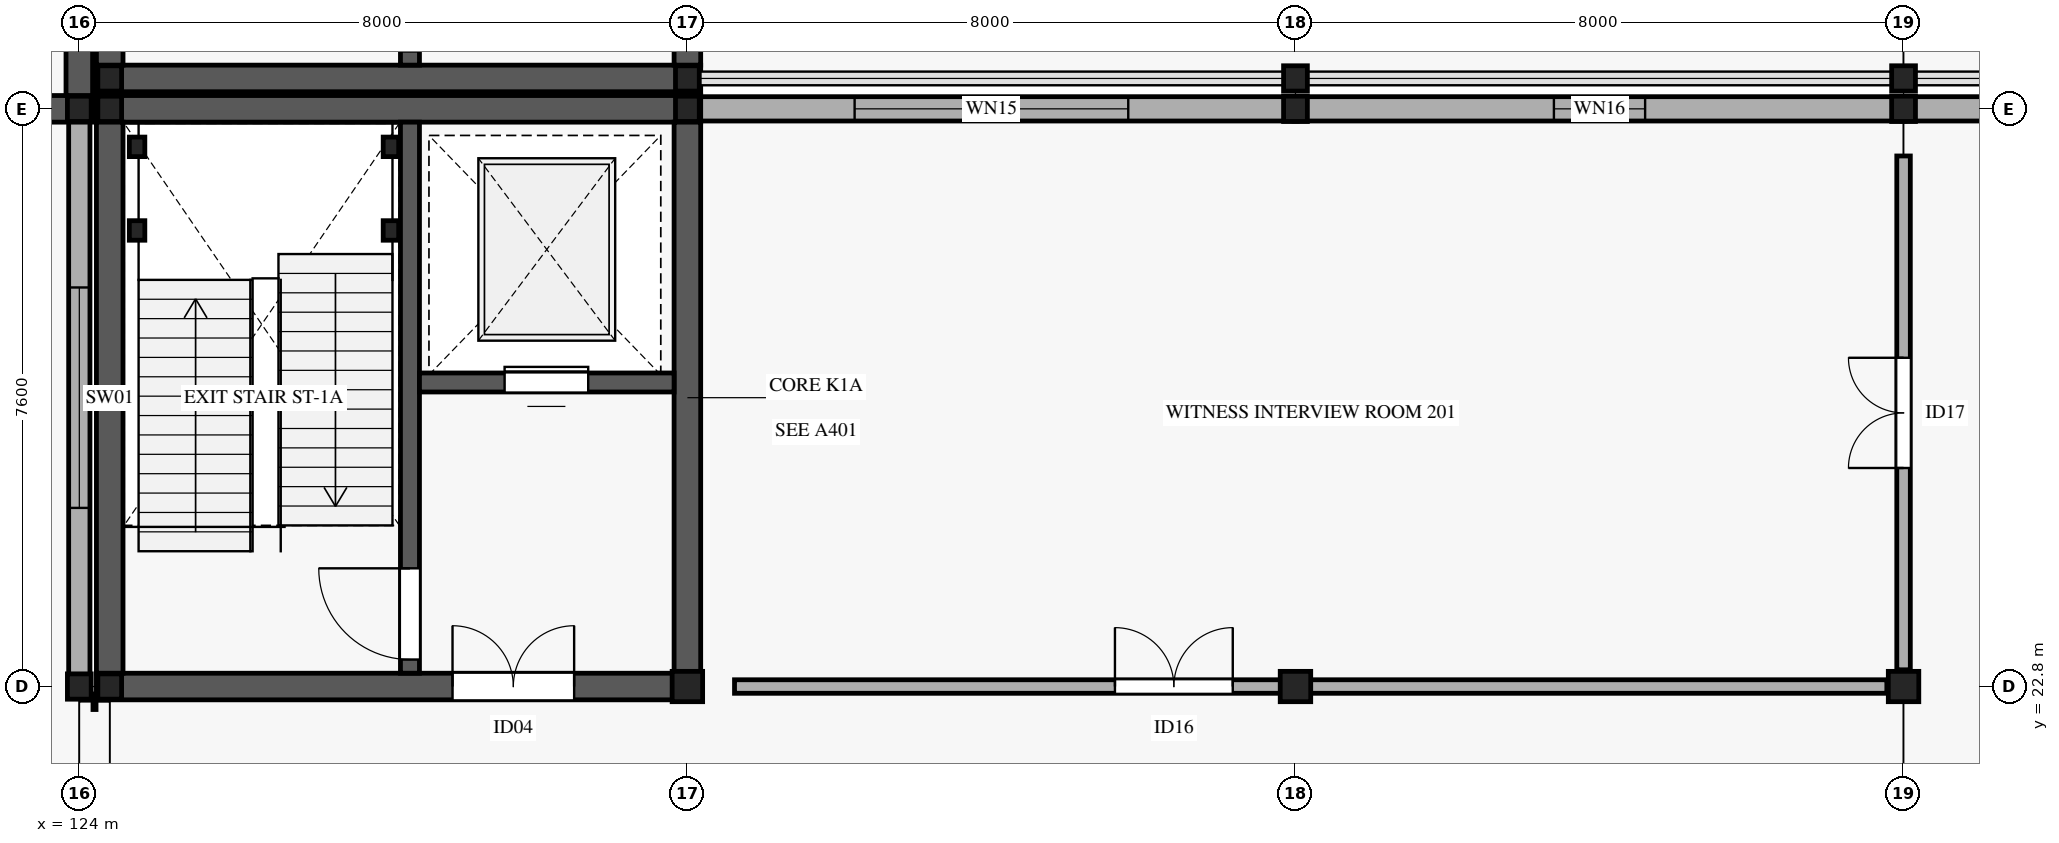
"""IFC4 building model, lengths in metres.
Left out: names, types, materials, properties, quantities, classifications, styles, units other than length and angle.
Written with IfcOpenShell. Run it as: python <this file> out.ifc"""

import sys

from ifc_helpers import new_model, si_unit, direction, frame, frame_2d, origin, origin_2d, place, context, subcontext, project, spatial, rectangle, i_section, extrude, element, fill, save


model = new_model("IFC4")
c1 = context("Model", 3, precision=1e-05, world=origin(), true_north=direction((0.0, 1.0)))
c2 = subcontext(c1, "Body", "Model", "MODEL_VIEW")
j1 = project(units=[si_unit("LENGTHUNIT", "METRE"), si_unit("PLANEANGLEUNIT", "RADIAN")], contexts=[c1])
p1 = place(None, origin())
s1 = spatial("IfcSite", under=j1, at=p1, CompositionType="ELEMENT")
p2 = place(p1, origin())
s2 = spatial("IfcBuilding", under=s1, at=p2, CompositionType="ELEMENT")
p3 = place(p2, frame((0.0, 0.0, 5.4)))
s3 = spatial("IfcBuildingStorey", under=s2, at=p3, CompositionType="ELEMENT", Elevation=5.4)
for number, where, z_axis, x_axis in (
    (1, (124.4, 22.8, 0.0), (0.0, 0.0, 1.0), (1.0, 0.0, 0.0)),
    (2, (124.4, 30.4, 0.0), (0.0, 0.0, 1.0), (1.0, 0.0, 0.0)),
):
    element("IfcColumn", number, at=place(p3, frame(where, z_axis=z_axis, x_axis=x_axis)), inside=s3, PredefinedType="COLUMN", context=c2, shape_type="SweptSolid", body=[
        extrude(i_section(OverallWidth=0.313, OverallDepth=0.333, WebThickness=0.018, FlangeThickness=0.028, FilletRadius=0.015, at=origin_2d()), origin(), (0.0, 0.0, 1.0), 5.185),
    ])
p4 = place(p3, frame((132.0, 22.8, 0.0), z_axis=(0.0, 0.0, 1.0), x_axis=(1.0, 0.0, 0.0)))
e3 = element("IfcColumn", 3, at=p4, inside=s3, PredefinedType="COLUMN", context=c2, shape_type="SweptSolid", body=[
    extrude(i_section(OverallWidth=0.401, OverallDepth=0.399, WebThickness=0.025, FlangeThickness=0.04, FilletRadius=0.015, at=origin_2d()), origin(), (0.0, 0.0, 1.0), 5.185),
])
p5 = place(p3, frame((132.0, 30.4, 0.0), z_axis=(0.0, 0.0, 1.0), x_axis=(1.0, 0.0, 0.0)))
e4 = element("IfcColumn", 4, at=p5, inside=s3, PredefinedType="COLUMN", context=c2, shape_type="SweptSolid", body=[
    extrude(i_section(OverallWidth=0.313, OverallDepth=0.333, WebThickness=0.018, FlangeThickness=0.028, FilletRadius=0.015, at=origin_2d()), origin(), (0.0, 0.0, 1.0), 5.185),
])
p6 = place(p3, frame((140.0, 22.8, 0.0), z_axis=(0.0, 0.0, 1.0), x_axis=(1.0, 0.0, 0.0)))
e5 = element("IfcColumn", 5, at=p6, inside=s3, PredefinedType="COLUMN", context=c2, shape_type="SweptSolid", body=[
    extrude(i_section(OverallWidth=0.401, OverallDepth=0.399, WebThickness=0.025, FlangeThickness=0.04, FilletRadius=0.015, at=origin_2d()), origin(), (0.0, 0.0, 1.0), 5.185),
])
p7 = place(p3, frame((140.0, 30.4, 0.0), z_axis=(0.0, 0.0, 1.0), x_axis=(1.0, 0.0, 0.0)))
e6 = element("IfcColumn", 6, at=p7, inside=s3, PredefinedType="COLUMN", context=c2, shape_type="SweptSolid", body=[
    extrude(i_section(OverallWidth=0.313, OverallDepth=0.333, WebThickness=0.018, FlangeThickness=0.028, FilletRadius=0.015, at=origin_2d()), origin(), (0.0, 0.0, 1.0), 5.185),
])
p8 = place(p3, frame((148.0, 22.8, 0.0), z_axis=(0.0, 0.0, 1.0), x_axis=(1.0, 0.0, 0.0)))
e7 = element("IfcColumn", 7, at=p8, inside=s3, PredefinedType="COLUMN", context=c2, shape_type="SweptSolid", body=[
    extrude(i_section(OverallWidth=0.401, OverallDepth=0.399, WebThickness=0.025, FlangeThickness=0.04, FilletRadius=0.015, at=origin_2d()), origin(), (0.0, 0.0, 1.0), 5.185),
])
for number, where, z_axis, x_axis in (
    (8, (148.0, 30.4, 0.0), (0.0, 0.0, 1.0), (1.0, 0.0, 0.0)),
    (9, (124.4, 30.8, 0.0), (0.0, 0.0, 1.0), (1.0, 0.0, 0.0)),
    (10, (132.0, 30.8, 0.0), (0.0, 0.0, 1.0), (1.0, 0.0, 0.0)),
    (11, (140.0, 30.8, 0.0), (0.0, 0.0, 1.0), (1.0, 0.0, 0.0)),
    (12, (148.0, 30.8, 0.0), (0.0, 0.0, 1.0), (1.0, 0.0, 0.0)),
    (13, (124.0, 22.8, 0.0), (0.0, 0.0, 1.0), (1.0, 0.0, 0.0)),
    (14, (124.0, 30.4, 0.0), (0.0, 0.0, 1.0), (1.0, 0.0, 0.0)),
):
    element("IfcColumn", number, at=place(p3, frame(where, z_axis=z_axis, x_axis=x_axis)), inside=s3, PredefinedType="COLUMN", context=c2, shape_type="SweptSolid", body=[
        extrude(i_section(OverallWidth=0.313, OverallDepth=0.333, WebThickness=0.018, FlangeThickness=0.028, FilletRadius=0.015, at=origin_2d()), origin(), (0.0, 0.0, 1.0), 5.185),
    ])
p9 = place(p3, frame((131.98, 30.4, 0.0), z_axis=(0.0, 0.0, 1.0), x_axis=(1.0, 0.0, 0.0)))
e15 = element("IfcWall", 15, at=p9, inside=s3, PredefinedType="STANDARD", context=c2, shape_type="SweptSolid", body=[
    extrude(rectangle(XDim=8.04, YDim=0.32, at=frame_2d((4.02, 0.0))), origin(), (0.0, 0.0, 1.0), 4.25),
])
p10 = place(p9, frame((2.22, 0.0, 0.75)))
e16 = element("IfcOpeningElement", 16, at=p10, cuts=e15, PredefinedType="OPENING", context=c2, shape_type="SweptSolid", body=[
    extrude(rectangle(XDim=3.6, YDim=2.15, at=frame_2d((1.8, 1.075))), frame((0.0, 0.17, 0.0), z_axis=(0.0, -1.0, 0.0), x_axis=(1.0, 0.0, 0.0)), (0.0, 0.0, 1.0), 0.34),
])
p11 = place(p3, frame((139.98, 30.4, 0.0), z_axis=(0.0, 0.0, 1.0), x_axis=(1.0, 0.0, 0.0)))
e17 = element("IfcWall", 17, at=p11, inside=s3, PredefinedType="STANDARD", context=c2, shape_type="SweptSolid", body=[
    extrude(rectangle(XDim=8.04, YDim=0.32, at=frame_2d((4.02, 0.0))), origin(), (0.0, 0.0, 1.0), 4.25),
])
p12 = place(p11, frame((3.42, 0.0, 0.75)))
e18 = element("IfcOpeningElement", 18, at=p12, cuts=e17, PredefinedType="OPENING", context=c2, shape_type="SweptSolid", body=[
    extrude(rectangle(XDim=1.2, YDim=1.8, at=frame_2d((0.6, 0.9))), frame((0.0, 0.17, 0.0), z_axis=(0.0, -1.0, 0.0), x_axis=(1.0, 0.0, 0.0)), (0.0, 0.0, 1.0), 0.34),
])
p13 = place(p3, frame((147.98, 30.4, 0.0), z_axis=(0.0, 0.0, 1.0), x_axis=(1.0, 0.0, 0.0)))
e19 = element("IfcWall", 19, at=p13, inside=s3, PredefinedType="STANDARD", context=c2, shape_type="SweptSolid", body=[
    extrude(rectangle(XDim=8.04, YDim=0.32, at=frame_2d((4.02, 0.0))), origin(), (0.0, 0.0, 1.0), 4.25),
])
p14 = place(p13, frame((3.295, 0.0, 0.75)))
e20 = element("IfcOpeningElement", 20, at=p14, cuts=e19, PredefinedType="OPENING", context=c2, shape_type="SweptSolid", body=[
    extrude(rectangle(XDim=1.45, YDim=1.8, at=frame_2d((0.725, 0.9))), frame((0.0, 0.17, 0.0), z_axis=(0.0, -1.0, 0.0), x_axis=(1.0, 0.0, 0.0)), (0.0, 0.0, 1.0), 0.34),
])
p15 = place(p3, frame((124.0, 30.42, 0.0), z_axis=(0.0, 0.0, 1.0), x_axis=(0.0, -1.0, 0.0)))
e21 = element("IfcWall", 21, at=p15, inside=s3, PredefinedType="STANDARD", context=c2, shape_type="SweptSolid", body=[
    extrude(rectangle(XDim=7.64, YDim=0.28, at=frame_2d((3.82, 0.0))), origin(), (0.0, 0.0, 1.0), 4.25),
])
p16 = place(p15, frame((2.37, 0.0, 0.75)))
e22 = element("IfcOpeningElement", 22, at=p16, cuts=e21, PredefinedType="OPENING", context=c2, shape_type="SweptSolid", body=[
    extrude(rectangle(XDim=2.9, YDim=2.15, at=frame_2d((1.45, 1.075))), frame((0.0, 0.15, 0.0), z_axis=(0.0, -1.0, 0.0), x_axis=(1.0, 0.0, 0.0)), (0.0, 0.0, 1.0), 0.3),
])
p17 = place(p3, frame((124.18, 22.6, 0.0), z_axis=(0.0, 0.0, 1.0), x_axis=(1.0, 0.0, 0.0)))
e23 = element("IfcWall", 23, at=p17, inside=s3, PredefinedType="STANDARD", context=c2, shape_type="SweptSolid", body=[
    extrude(rectangle(XDim=0.04, YDim=0.205, at=frame_2d((0.02, 0.0))), origin(), (0.0, 0.0, 1.0), 4.62),
])
p18 = place(p3, frame((124.225, 22.8, 0.0), z_axis=(0.0, 0.0, 1.0), x_axis=(1.0, 0.0, 0.0)))
e24 = element("IfcWall", 24, at=p18, inside=s3, PredefinedType="SHEAR", context=c2, shape_type="SweptSolid", body=[
    extrude(rectangle(XDim=7.95, YDim=0.35, at=frame_2d((3.975, 0.0))), origin(), (0.0, 0.0, 1.0), 5.19),
])
p19 = place(p18, frame((4.685, 0.0, 0.0)))
e25 = element("IfcOpeningElement", 25, at=p19, cuts=e24, PredefinedType="OPENING", context=c2, shape_type="SweptSolid", body=[
    extrude(rectangle(XDim=1.6, YDim=2.35, at=frame_2d((0.8, 1.175))), frame((0.0, 0.185, 0.0), z_axis=(0.0, -1.0, 0.0), x_axis=(1.0, 0.0, 0.0)), (0.0, 0.0, 1.0), 0.37),
])
p20 = place(p3, frame((124.225, 30.4, 0.0), z_axis=(0.0, 0.0, 1.0), x_axis=(1.0, 0.0, 0.0)))
e26 = element("IfcWall", 26, at=p20, inside=s3, PredefinedType="SHEAR", context=c2, shape_type="SweptSolid", body=[
    extrude(rectangle(XDim=7.95, YDim=0.35, at=frame_2d((3.975, 0.0))), origin(), (0.0, 0.0, 1.0), 5.19),
])
for number, where, z_axis, x_axis in (
    (27, (124.4, 22.975, 0.0), (0.0, 0.0, 1.0), (0.0, 1.0, 0.0)),
    (28, (132.0, 22.975, 0.0), (0.0, 0.0, 1.0), (0.0, 1.0, 0.0)),
):
    element("IfcWall", number, at=place(p3, frame(where, z_axis=z_axis, x_axis=x_axis)), inside=s3, PredefinedType="SHEAR", context=c2, shape_type="SweptSolid", body=[
        extrude(rectangle(XDim=7.25, YDim=0.35, at=frame_2d((3.625, 0.0))), origin(), (0.0, 0.0, 1.0), 5.19),
    ])
p21 = place(p3, frame((128.35, 22.975, 0.0), z_axis=(0.0, 0.0, 1.0), x_axis=(0.0, 1.0, 0.0)))
e29 = element("IfcWall", 29, at=p21, inside=s3, PredefinedType="SHEAR", context=c2, shape_type="SweptSolid", body=[
    extrude(rectangle(XDim=7.25, YDim=0.25, at=frame_2d((3.625, 0.0))), origin(), (0.0, 0.0, 1.0), 5.19),
])
p22 = place(p21, frame((0.18, 0.0, 0.0)))
e30 = element("IfcOpeningElement", 30, at=p22, cuts=e29, PredefinedType="OPENING", context=c2, shape_type="SweptSolid", body=[
    extrude(rectangle(XDim=1.2, YDim=2.2, at=frame_2d((0.6, 1.1))), frame((0.0, 0.135, 0.0), z_axis=(0.0, -1.0, 0.0), x_axis=(1.0, 0.0, 0.0)), (0.0, 0.0, 1.0), 0.27),
])
p23 = place(p3, frame((128.475, 26.8, 0.0), z_axis=(0.0, 0.0, 1.0), x_axis=(1.0, 0.0, 0.0)))
e31 = element("IfcWall", 31, at=p23, inside=s3, PredefinedType="SHEAR", context=c2, shape_type="SweptSolid", body=[
    extrude(rectangle(XDim=3.35, YDim=0.25, at=frame_2d((1.675, 0.0))), origin(), (0.0, 0.0, 1.0), 5.19),
])
p24 = place(p23, frame((1.12, 0.0, 0.0)))
e32 = element("IfcOpeningElement", 32, at=p24, cuts=e31, PredefinedType="OPENING", context=c2, shape_type="SweptSolid", body=[
    extrude(rectangle(XDim=1.1, YDim=2.2, at=frame_2d((0.55, 1.1))), frame((0.0, 0.135, 0.0), z_axis=(0.0, -1.0, 0.0), x_axis=(1.0, 0.0, 0.0)), (0.0, 0.0, 1.0), 0.27),
])
for number, where, z_axis, x_axis in (
    (33, (124.76, 28.8, 0.0), (0.0, 0.0, 1.0), (1.0, 0.0, 0.0)),
    (34, (128.1, 28.8, 0.0), (0.0, 0.0, 1.0), (1.0, 0.0, 0.0)),
    (35, (124.76, 29.9, 0.0), (0.0, 0.0, 1.0), (1.0, 0.0, 0.0)),
    (36, (128.1, 29.9, 0.0), (0.0, 0.0, 1.0), (1.0, 0.0, 0.0)),
):
    element("IfcColumn", number, at=place(p3, frame(where, z_axis=z_axis, x_axis=x_axis)), inside=s3, PredefinedType="COLUMN", context=c2, shape_type="SweptSolid", body=[
        extrude(i_section(OverallWidth=0.204, OverallDepth=0.257, WebThickness=0.009, FlangeThickness=0.016, FilletRadius=0.013, at=origin_2d()), origin(), (0.0, 0.0, 1.0), 5.395),
    ])
p25 = place(p3, frame((124.225, 30.8, 0.0), z_axis=(0.0, 0.0, 1.0), x_axis=(1.0, 0.0, 0.0)))
e37 = element("IfcWall", 37, at=p25, inside=s3, PredefinedType="SHEAR", context=c2, shape_type="SweptSolid", body=[
    extrude(rectangle(XDim=7.95, YDim=0.35, at=frame_2d((3.975, 0.0))), origin(), (0.0, 0.0, 1.0), 5.19),
])
p26 = place(p3, frame((124.4, 30.975, 0.0), z_axis=(0.0, 0.0, 1.0), x_axis=(0.0, 1.0, 0.0)))
e38 = element("IfcWall", 38, at=p26, inside=s3, PredefinedType="SHEAR", context=c2, shape_type="SweptSolid", body=[
    extrude(rectangle(XDim=6.85, YDim=0.35, at=frame_2d((3.425, 0.0))), origin(), (0.0, 0.0, 1.0), 5.19),
])
p27 = place(p3, frame((132.0, 30.975, 0.0), z_axis=(0.0, 0.0, 1.0), x_axis=(0.0, 1.0, 0.0)))
e39 = element("IfcWall", 39, at=p27, inside=s3, PredefinedType="SHEAR", context=c2, shape_type="SweptSolid", body=[
    extrude(rectangle(XDim=6.85, YDim=0.35, at=frame_2d((3.425, 0.0))), origin(), (0.0, 0.0, 1.0), 5.19),
])
p28 = place(p27, frame((1.15, 0.0, 0.0)))
e40 = element("IfcOpeningElement", 40, at=p28, cuts=e39, PredefinedType="OPENING", context=c2, shape_type="SweptSolid", body=[
    extrude(rectangle(XDim=1.6, YDim=2.35, at=frame_2d((0.8, 1.175))), frame((0.0, 0.185, 0.0), z_axis=(0.0, -1.0, 0.0), x_axis=(1.0, 0.0, 0.0)), (0.0, 0.0, 1.0), 0.37),
])
p29 = place(p3, frame((128.35, 30.975, 0.0), z_axis=(0.0, 0.0, 1.0), x_axis=(0.0, 1.0, 0.0)))
e41 = element("IfcWall", 41, at=p29, inside=s3, PredefinedType="SHEAR", context=c2, shape_type="SweptSolid", body=[
    extrude(rectangle(XDim=6.85, YDim=0.25, at=frame_2d((3.425, 0.0))), origin(), (0.0, 0.0, 1.0), 5.19),
])
p30 = place(p29, frame((0.18, 0.0, 0.0)))
e42 = element("IfcOpeningElement", 42, at=p30, cuts=e41, PredefinedType="OPENING", context=c2, shape_type="SweptSolid", body=[
    extrude(rectangle(XDim=1.2, YDim=2.2, at=frame_2d((0.6, 1.1))), frame((0.0, 0.135, 0.0), z_axis=(0.0, -1.0, 0.0), x_axis=(1.0, 0.0, 0.0)), (0.0, 0.0, 1.0), 0.27),
])
p31 = place(p3, frame((115.825, 30.4, 0.0), z_axis=(0.0, 0.0, 1.0), x_axis=(1.0, 0.0, 0.0)))
e43 = element("IfcWall", 43, at=p31, inside=s3, PredefinedType="SHEAR", context=c2, shape_type="SweptSolid", body=[
    extrude(rectangle(XDim=8.35, YDim=0.35, at=frame_2d((4.175, 0.0))), origin(), (0.0, 0.0, 1.0), 5.19),
])
p32 = place(p31, frame((4.685, 0.0, 0.0)))
e44 = element("IfcOpeningElement", 44, at=p32, cuts=e43, PredefinedType="OPENING", context=c2, shape_type="SweptSolid", body=[
    extrude(rectangle(XDim=1.6, YDim=2.35, at=frame_2d((0.8, 1.175))), frame((0.0, 0.185, 0.0), z_axis=(0.0, -1.0, 0.0), x_axis=(1.0, 0.0, 0.0)), (0.0, 0.0, 1.0), 0.37),
])
p33 = place(p3, frame((124.0, 30.575, 0.0), z_axis=(0.0, 0.0, 1.0), x_axis=(0.0, 1.0, 0.0)))
e45 = element("IfcWall", 45, at=p33, inside=s3, PredefinedType="SHEAR", context=c2, shape_type="SweptSolid", body=[
    extrude(rectangle(XDim=7.25, YDim=0.35, at=frame_2d((3.625, 0.0))), origin(), (0.0, 0.0, 1.0), 5.19),
])
p34 = place(p3, frame((132.62, 22.8, 0.0), z_axis=(0.0, 0.0, 1.0), x_axis=(1.0, 0.0, 0.0)))
e46 = element("IfcWall", 46, at=p34, inside=s3, PredefinedType="PARTITIONING", context=c2, shape_type="SweptSolid", body=[
    extrude(rectangle(XDim=15.16, YDim=0.178, at=frame_2d((7.58, 0.0))), origin(), (0.0, 0.0, 1.0), 4.05),
])
p35 = place(p34, frame((5.005, 0.0, 0.0)))
e47 = element("IfcOpeningElement", 47, at=p35, cuts=e46, PredefinedType="OPENING", context=c2, shape_type="SweptSolid", body=[
    extrude(rectangle(XDim=1.55, YDim=2.3, at=frame_2d((0.775, 1.15))), frame((0.0, 0.099, 0.0), z_axis=(0.0, -1.0, 0.0), x_axis=(1.0, 0.0, 0.0)), (0.0, 0.0, 1.0), 0.198),
])
p36 = place(p3, frame((148.0, 23.02, 0.0), z_axis=(0.0, 0.0, 1.0), x_axis=(0.0, 1.0, 0.0)))
e48 = element("IfcWall", 48, at=p36, inside=s3, PredefinedType="PARTITIONING", context=c2, shape_type="SweptSolid", body=[
    extrude(rectangle(XDim=6.76, YDim=0.178, at=frame_2d((3.38, 0.0))), origin(), (0.0, 0.0, 1.0), 4.05),
])
p37 = place(p36, frame((2.655, 0.0, 0.0)))
e49 = element("IfcOpeningElement", 49, at=p37, cuts=e48, PredefinedType="OPENING", context=c2, shape_type="SweptSolid", body=[
    extrude(rectangle(XDim=1.45, YDim=2.25, at=frame_2d((0.725, 1.125))), frame((0.0, 0.099, 0.0), z_axis=(0.0, -1.0, 0.0), x_axis=(1.0, 0.0, 0.0)), (0.0, 0.0, 1.0), 0.198),
])
p38 = place(p10, origin())
e50 = element("IfcWindow", 50, at=p38, inside=s3, PartitioningType="SINGLE_PANEL", PredefinedType="WINDOW", context=c2, shape_type="SweptSolid", body=[
    extrude(rectangle(XDim=3.6, YDim=2.15, at=frame_2d((1.8, 1.075))), frame((0.0, 0.03, 0.0), z_axis=(0.0, -1.0, 0.0), x_axis=(1.0, 0.0, 0.0)), (0.0, 0.0, 1.0), 0.06),
])
fill(e16, e50)
p39 = place(p12, origin())
e51 = element("IfcWindow", 51, at=p39, inside=s3, PartitioningType="SINGLE_PANEL", PredefinedType="WINDOW", context=c2, shape_type="SweptSolid", body=[
    extrude(rectangle(XDim=1.2, YDim=1.8, at=frame_2d((0.6, 0.9))), frame((0.0, 0.03, 0.0), z_axis=(0.0, -1.0, 0.0), x_axis=(1.0, 0.0, 0.0)), (0.0, 0.0, 1.0), 0.06),
])
fill(e18, e51)
p40 = place(p16, origin())
e52 = element("IfcWindow", 52, at=p40, inside=s3, PartitioningType="SINGLE_PANEL", PredefinedType="WINDOW", context=c2, shape_type="SweptSolid", body=[
    extrude(rectangle(XDim=2.9, YDim=2.15, at=frame_2d((1.45, 1.075))), frame((0.0, 0.03, 0.0), z_axis=(0.0, -1.0, 0.0), x_axis=(1.0, 0.0, 0.0)), (0.0, 0.0, 1.0), 0.06),
])
fill(e22, e52)
p41 = place(p22, origin())
e53 = element("IfcDoor", 53, at=p41, inside=s3, OperationType="SINGLE_SWING_RIGHT", PredefinedType="DOOR", context=c2, shape_type="SweptSolid", body=[
    extrude(rectangle(XDim=1.2, YDim=2.2, at=frame_2d((0.6, 1.1))), frame((0.0, 0.025, 0.0), z_axis=(0.0, -1.0, 0.0), x_axis=(1.0, 0.0, 0.0)), (0.0, 0.0, 1.0), 0.05),
])
fill(e30, e53)
p42 = place(p19, origin())
e54 = element("IfcDoor", 54, at=p42, inside=s3, OperationType="DOUBLE_DOOR_SINGLE_SWING", PredefinedType="DOOR", context=c2, shape_type="SweptSolid", body=[
    extrude(rectangle(XDim=1.6, YDim=2.35, at=frame_2d((0.8, 1.175))), frame((0.0, 0.025, 0.0), z_axis=(0.0, -1.0, 0.0), x_axis=(1.0, 0.0, 0.0)), (0.0, 0.0, 1.0), 0.05),
])
fill(e25, e54)
p43 = place(p24, origin())
e55 = element("IfcDoor", 55, at=p43, inside=s3, OperationType="SLIDING_TO_LEFT", PredefinedType="DOOR", context=c2, shape_type="SweptSolid", body=[
    extrude(rectangle(XDim=1.1, YDim=2.2, at=frame_2d((0.55, 1.1))), frame((0.0, 0.025, 0.0), z_axis=(0.0, -1.0, 0.0), x_axis=(1.0, 0.0, 0.0)), (0.0, 0.0, 1.0), 0.05),
])
fill(e32, e55)
p44 = place(p35, origin())
e56 = element("IfcDoor", 56, at=p44, inside=s3, OperationType="DOUBLE_DOOR_SINGLE_SWING", PredefinedType="DOOR", context=c2, shape_type="SweptSolid", body=[
    extrude(rectangle(XDim=1.55, YDim=2.3, at=frame_2d((0.775, 1.15))), frame((0.0, 0.025, 0.0), z_axis=(0.0, -1.0, 0.0), x_axis=(1.0, 0.0, 0.0)), (0.0, 0.0, 1.0), 0.05),
])
fill(e47, e56)
p45 = place(p37, origin())
e57 = element("IfcDoor", 57, at=p45, inside=s3, OperationType="DOUBLE_DOOR_SINGLE_SWING", PredefinedType="DOOR", context=c2, shape_type="SweptSolid", body=[
    extrude(rectangle(XDim=1.45, YDim=2.25, at=frame_2d((0.725, 1.125))), frame((0.0, 0.025, 0.0), z_axis=(0.0, -1.0, 0.0), x_axis=(1.0, 0.0, 0.0)), (0.0, 0.0, 1.0), 0.05),
])
fill(e49, e57)
save(model, sys.argv[1])
